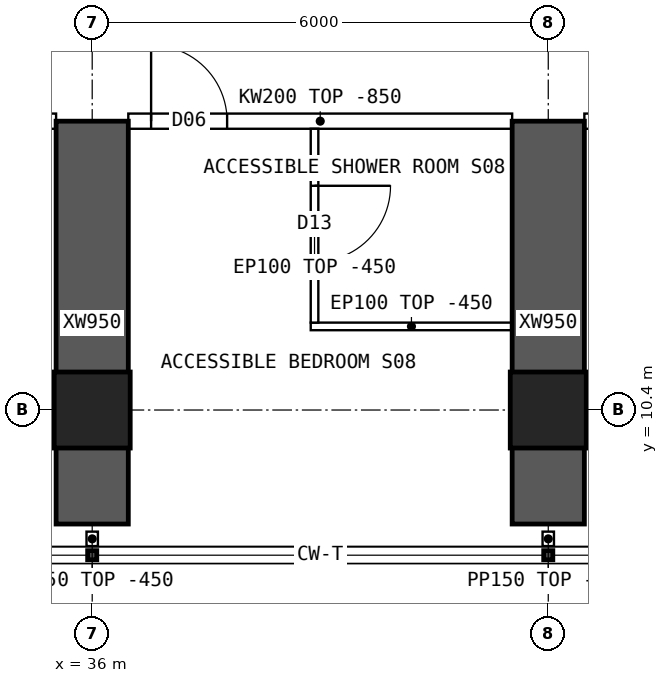
"""IFC4 building model, lengths in metres.
Left out: names, types, materials, properties, quantities, classifications, styles, units other than length and angle.
Written with IfcOpenShell. Run it as: python <this file> out.ifc"""

import sys

from ifc_helpers import new_model, si_unit, direction, frame, frame_2d, origin, origin_2d, place, context, subcontext, project, spatial, polyline, rectangle, hollow_rectangle, outline, extrude, element, fill, save


model = new_model("IFC4")
c1 = context("Model", 3, precision=1e-05, world=origin(), true_north=direction((0.0, 1.0)))
c2 = subcontext(c1, "Body", "Model", "MODEL_VIEW")
j1 = project(units=[si_unit("LENGTHUNIT", "METRE"), si_unit("PLANEANGLEUNIT", "RADIAN")], contexts=[c1])
p1 = place(None, origin())
s1 = spatial("IfcSite", under=j1, at=p1, CompositionType="ELEMENT")
p2 = place(p1, origin())
s2 = spatial("IfcBuilding", under=s1, at=p2, CompositionType="ELEMENT")
p3 = place(p2, frame((0.0, 0.0, 95.65)))
s3 = spatial("IfcBuildingStorey", under=s2, at=p3, CompositionType="ELEMENT", Elevation=95.65)
for number, where, z_axis, x_axis in (
    (1, (36.0, 10.4, 0.0), (0.0, 0.0, 1.0), (1.0, 0.0, 0.0)),
    (2, (42.0, 10.4, 0.0), (0.0, 0.0, 1.0), (1.0, 0.0, 0.0)),
):
    element("IfcColumn", number, at=place(p3, frame(where, z_axis=z_axis, x_axis=x_axis)), inside=s3, PredefinedType="COLUMN", context=c2, shape_type="SweptSolid", body=[
        extrude(hollow_rectangle(XDim=1.0, YDim=1.0, WallThickness=0.1, at=origin_2d()), origin(), (0.0, 0.0, 1.0), 3.75),
    ])
for number, where, z_axis, x_axis in (
    (3, (36.0, 8.9, 0.0), (0.0, 0.0, 1.0), (0.0, 1.0, 0.0)),
    (4, (42.0, 8.9, 0.0), (0.0, 0.0, 1.0), (0.0, 1.0, 0.0)),
):
    element("IfcWall", number, at=place(p3, frame(where, z_axis=z_axis, x_axis=x_axis)), inside=s3, PredefinedType="SHEAR", context=c2, shape_type="SweptSolid", body=[
        extrude(rectangle(XDim=5.3, YDim=0.95, at=frame_2d((2.65, 0.0))), origin(), (0.0, 0.0, 1.0), 3.75),
    ])
p4 = place(p3, frame((30.475, 14.2, 0.0), z_axis=(0.0, 0.0, 1.0), x_axis=(1.0, 0.0, 0.0)))
e5 = element("IfcWall", 5, at=p4, inside=s3, PredefinedType="SOLIDWALL", context=c2, shape_type="SweptSolid", body=[
    extrude(outline(polyline([(0.0, 0.0), (5.05, 0.0), (5.05, 2.9), (0.0, 2.9), (0.0, 0.0)])), frame((0.0, 0.1, 0.0), z_axis=(0.0, -1.0, 0.0), x_axis=(1.0, 0.0, 0.0)), (0.0, 0.0, 1.0), 0.2),
])
p5 = place(p4, frame((0.1, 0.0, 0.0)))
e6 = element("IfcOpeningElement", 6, at=p5, cuts=e5, PredefinedType="OPENING", context=c2, shape_type="SweptSolid", body=[
    extrude(rectangle(XDim=0.9, YDim=2.1, at=frame_2d((0.45, 1.05))), frame((0.0, 0.11, 0.0), z_axis=(0.0, -1.0, 0.0), x_axis=(1.0, 0.0, 0.0)), (0.0, 0.0, 1.0), 0.22),
])
p6 = place(p4, frame((4.05, 0.0, 0.0)))
e7 = element("IfcOpeningElement", 7, at=p6, cuts=e5, PredefinedType="OPENING", context=c2, shape_type="SweptSolid", body=[
    extrude(rectangle(XDim=0.9, YDim=2.1, at=frame_2d((0.45, 1.05))), frame((0.0, 0.11, 0.0), z_axis=(0.0, -1.0, 0.0), x_axis=(1.0, 0.0, 0.0)), (0.0, 0.0, 1.0), 0.22),
])
p7 = place(p3, frame((36.475, 14.2, 0.0), z_axis=(0.0, 0.0, 1.0), x_axis=(1.0, 0.0, 0.0)))
e8 = element("IfcWall", 8, at=p7, inside=s3, PredefinedType="SOLIDWALL", context=c2, shape_type="SweptSolid", body=[
    extrude(outline(polyline([(0.0, 0.0), (5.05, 0.0), (5.05, 2.9), (0.0, 2.9), (0.0, 0.0)])), frame((0.0, 0.1, 0.0), z_axis=(0.0, -1.0, 0.0), x_axis=(1.0, 0.0, 0.0)), (0.0, 0.0, 1.0), 0.2),
])
p8 = place(p7, frame((0.3, 0.0, 0.0)))
e9 = element("IfcOpeningElement", 9, at=p8, cuts=e8, PredefinedType="OPENING", context=c2, shape_type="SweptSolid", body=[
    extrude(rectangle(XDim=1.0, YDim=2.1, at=frame_2d((0.5, 1.05))), frame((0.0, 0.11, 0.0), z_axis=(0.0, -1.0, 0.0), x_axis=(1.0, 0.0, 0.0)), (0.0, 0.0, 1.0), 0.22),
])
p9 = place(p3, frame((42.475, 14.2, 0.0), z_axis=(0.0, 0.0, 1.0), x_axis=(1.0, 0.0, 0.0)))
e10 = element("IfcWall", 10, at=p9, inside=s3, PredefinedType="SOLIDWALL", context=c2, shape_type="SweptSolid", body=[
    extrude(outline(polyline([(0.0, 0.0), (5.05, 0.0), (5.05, 2.9), (0.0, 2.9), (0.0, 0.0)])), frame((0.0, 0.1, 0.0), z_axis=(0.0, -1.0, 0.0), x_axis=(1.0, 0.0, 0.0)), (0.0, 0.0, 1.0), 0.2),
])
p10 = place(p9, frame((0.1, 0.0, 0.0)))
e11 = element("IfcOpeningElement", 11, at=p10, cuts=e10, PredefinedType="OPENING", context=c2, shape_type="SweptSolid", body=[
    extrude(rectangle(XDim=0.9, YDim=2.1, at=frame_2d((0.45, 1.05))), frame((0.0, 0.11, 0.0), z_axis=(0.0, -1.0, 0.0), x_axis=(1.0, 0.0, 0.0)), (0.0, 0.0, 1.0), 0.22),
])
p11 = place(p9, frame((4.05, 0.0, 0.0)))
e12 = element("IfcOpeningElement", 12, at=p11, cuts=e10, PredefinedType="OPENING", context=c2, shape_type="SweptSolid", body=[
    extrude(rectangle(XDim=0.9, YDim=2.1, at=frame_2d((0.45, 1.05))), frame((0.0, 0.11, 0.0), z_axis=(0.0, -1.0, 0.0), x_axis=(1.0, 0.0, 0.0)), (0.0, 0.0, 1.0), 0.22),
])
p12 = place(p3, frame((38.875, 11.5, 0.0), z_axis=(0.0, 0.0, 1.0), x_axis=(1.0, 0.0, 0.0)))
e13 = element("IfcWall", 13, at=p12, inside=s3, PredefinedType="PARTITIONING", context=c2, shape_type="SweptSolid", body=[
    extrude(rectangle(XDim=2.65, YDim=0.1, at=frame_2d((1.325, 0.0))), origin(), (0.0, 0.0, 1.0), 3.3),
])
p13 = place(p3, frame((38.925, 11.55, 0.0), z_axis=(0.0, 0.0, 1.0), x_axis=(0.0, 1.0, 0.0)))
e14 = element("IfcWall", 14, at=p13, inside=s3, PredefinedType="PARTITIONING", context=c2, shape_type="SweptSolid", body=[
    extrude(outline(polyline([(0.0, 0.0), (2.55, 0.0), (2.55, 2.9), (2.502, 2.9), (2.5, 3.3), (0.0, 3.3), (0.0, 0.0)])), frame((0.0, 0.05, 0.0), z_axis=(0.0, -1.0, 0.0), x_axis=(1.0, 0.0, 0.0)), (0.0, 0.0, 1.0), 0.1),
])
p14 = place(p13, frame((0.8, 0.0, 0.0)))
e15 = element("IfcOpeningElement", 15, at=p14, cuts=e14, PredefinedType="OPENING", context=c2, shape_type="SweptSolid", body=[
    extrude(rectangle(XDim=1.0, YDim=2.1, at=frame_2d((0.5, 1.05))), frame((0.0, 0.06, 0.0), z_axis=(0.0, -1.0, 0.0), x_axis=(1.0, 0.0, 0.0)), (0.0, 0.0, 1.0), 0.12),
])
for number, where, z_axis, x_axis in (
    (16, (36.0, 8.8, 0.0), (0.0, 0.0, 1.0), (0.0, -1.0, 0.0)),
    (17, (42.0, 8.8, 0.0), (0.0, 0.0, 1.0), (0.0, -1.0, 0.0)),
):
    element("IfcWall", number, at=place(p3, frame(where, z_axis=z_axis, x_axis=x_axis)), inside=s3, PredefinedType="PARTITIONING", context=c2, shape_type="SweptSolid", body=[
        extrude(rectangle(XDim=0.19, YDim=0.15, at=frame_2d((0.095, 0.0))), origin(), (0.0, 0.0, 1.0), 3.3),
    ])
p15 = place(p14, origin())
e18 = element("IfcDoor", 18, at=p15, inside=s3, OperationType="SINGLE_SWING_RIGHT", PredefinedType="DOOR", context=c2, shape_type="SweptSolid", body=[
    extrude(rectangle(XDim=1.0, YDim=2.1, at=frame_2d((0.5, 1.05))), frame((0.0, 0.025, 0.0), z_axis=(0.0, -1.0, 0.0), x_axis=(1.0, 0.0, 0.0)), (0.0, 0.0, 1.0), 0.05),
])
fill(e15, e18)
p16 = place(p8, origin())
e19 = element("IfcDoor", 19, at=p16, inside=s3, OperationType="SINGLE_SWING_LEFT", PredefinedType="DOOR", context=c2, shape_type="SweptSolid", body=[
    extrude(rectangle(XDim=1.0, YDim=2.1, at=frame_2d((0.5, 1.05))), frame((0.0, 0.025, 0.0), z_axis=(0.0, -1.0, 0.0), x_axis=(1.0, 0.0, 0.0)), (0.0, 0.0, 1.0), 0.05),
])
fill(e9, e19)
save(model, sys.argv[1])
